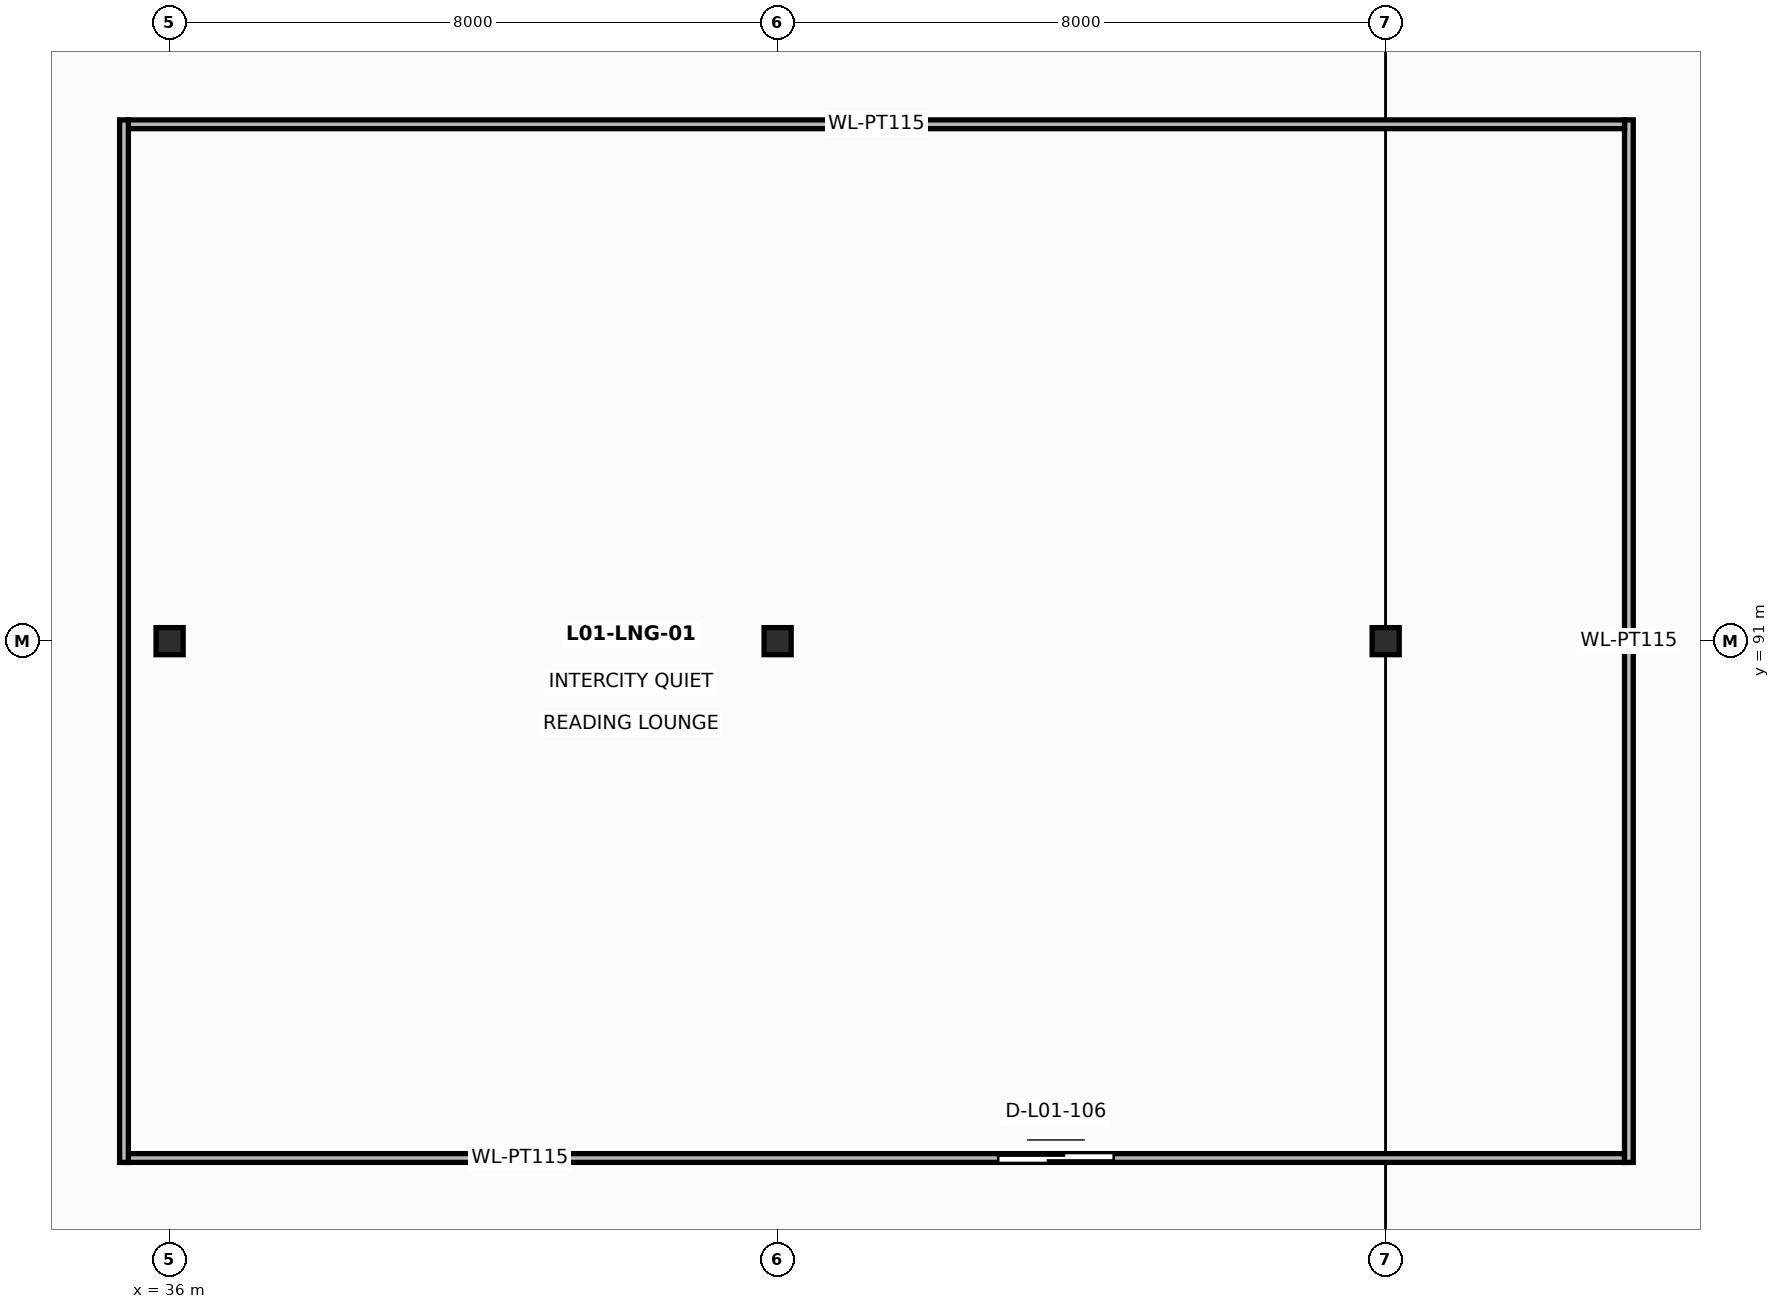
"""IFC4 building model, lengths in metres.
Left out: names, types, materials, properties, quantities, classifications, styles, units other than length and angle.
Written with IfcOpenShell. Run it as: python <this file> out.ifc"""

import sys

from ifc_helpers import new_model, si_unit, direction, frame, frame_2d, origin, origin_2d, place, context, subcontext, project, spatial, rectangle, hollow_rectangle, extrude, element, fill, save


model = new_model("IFC4")
c1 = context("Model", 3, precision=1e-05, world=origin(), true_north=direction((0.0, 1.0)))
c2 = subcontext(c1, "Body", "Model", "MODEL_VIEW")
j1 = project(units=[si_unit("LENGTHUNIT", "METRE"), si_unit("PLANEANGLEUNIT", "RADIAN")], contexts=[c1])
p1 = place(None, origin())
s1 = spatial("IfcSite", under=j1, at=p1, CompositionType="ELEMENT")
p2 = place(p1, origin())
s2 = spatial("IfcBuilding", under=s1, at=p2, CompositionType="ELEMENT")
p3 = place(p2, frame((0.0, 0.0, 6.0)))
s3 = spatial("IfcBuildingStorey", under=s2, at=p3, CompositionType="ELEMENT", Elevation=6.0)
for number, where, z_axis, x_axis in (
    (1, (36.0, 91.0, 0.0), (0.0, 0.0, 1.0), (1.0, 0.0, 0.0)),
    (2, (44.0, 91.0, 0.0), (0.0, 0.0, 1.0), (1.0, 0.0, 0.0)),
    (3, (52.0, 91.0, 0.0), (0.0, 0.0, 1.0), (1.0, 0.0, 0.0)),
):
    element("IfcColumn", number, at=place(p3, frame(where, z_axis=z_axis, x_axis=x_axis)), inside=s3, PredefinedType="COLUMN", context=c2, shape_type="SweptSolid", body=[
        extrude(hollow_rectangle(XDim=0.356, YDim=0.356, WallThickness=0.015, at=origin_2d()), origin(), (0.0, 0.0, 1.0), 5.2),
    ])
p4 = place(p3, frame((35.457, 84.2, 0.0), z_axis=(0.0, 0.0, 1.0), x_axis=(1.0, 0.0, 0.0)))
e4 = element("IfcWall", 4, at=p4, inside=s3, PredefinedType="PARTITIONING", context=c2, shape_type="SweptSolid", body=[
    extrude(rectangle(XDim=19.686, YDim=0.115, at=frame_2d((9.843, 0.0))), origin(), (0.0, 0.0, 1.0), 4.87),
])
p5 = place(p4, frame((11.445, 0.0, 0.0)))
e5 = element("IfcOpeningElement", 5, at=p5, cuts=e4, PredefinedType="OPENING", context=c2, shape_type="SweptSolid", body=[
    extrude(rectangle(XDim=1.52, YDim=2.2, at=frame_2d((0.76, 1.1))), frame((0.0, 0.067, 0.0), z_axis=(0.0, -1.0, 0.0), x_axis=(1.0, 0.0, 0.0)), (0.0, 0.0, 1.0), 0.135),
])
p6 = place(p3, frame((55.2, 84.142, 0.0), z_axis=(0.0, 0.0, 1.0), x_axis=(0.0, 1.0, 0.0)))
e6 = element("IfcWall", 6, at=p6, inside=s3, PredefinedType="PARTITIONING", context=c2, shape_type="SweptSolid", body=[
    extrude(rectangle(XDim=13.716, YDim=0.115, at=frame_2d((6.858, 0.0))), origin(), (0.0, 0.0, 1.0), 4.87),
])
p7 = place(p3, frame((55.143, 97.8, 0.0), z_axis=(0.0, 0.0, 1.0), x_axis=(-1.0, 0.0, 0.0)))
e7 = element("IfcWall", 7, at=p7, inside=s3, PredefinedType="PARTITIONING", context=c2, shape_type="SweptSolid", body=[
    extrude(rectangle(XDim=19.686, YDim=0.115, at=frame_2d((9.843, 0.0))), origin(), (0.0, 0.0, 1.0), 4.87),
])
p8 = place(p3, frame((35.4, 97.858, 0.0), z_axis=(0.0, 0.0, 1.0), x_axis=(0.0, -1.0, 0.0)))
e8 = element("IfcWall", 8, at=p8, inside=s3, PredefinedType="PARTITIONING", context=c2, shape_type="SweptSolid", body=[
    extrude(rectangle(XDim=13.716, YDim=0.115, at=frame_2d((6.858, 0.0))), origin(), (0.0, 0.0, 1.0), 4.87),
])
p9 = place(p5, origin())
e9 = element("IfcDoor", 9, at=p9, inside=s3, OperationType="DOUBLE_DOOR_SLIDING", PredefinedType="DOOR", context=c2, shape_type="SweptSolid", body=[
    extrude(rectangle(XDim=1.52, YDim=2.2, at=frame_2d((0.76, 1.1))), frame((0.0, 0.025, 0.0), z_axis=(0.0, -1.0, 0.0), x_axis=(1.0, 0.0, 0.0)), (0.0, 0.0, 1.0), 0.05),
])
fill(e5, e9)
save(model, sys.argv[1])
